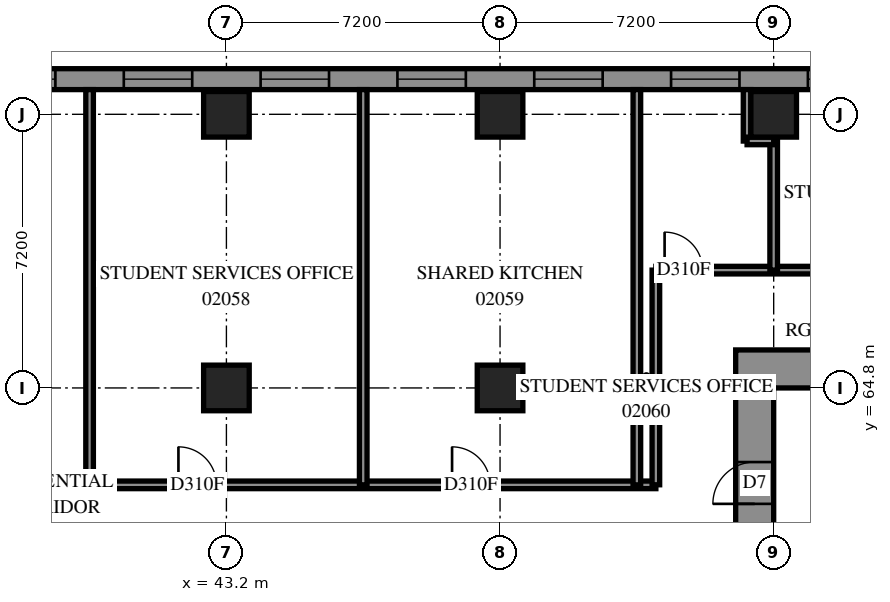
"""IFC4 building model, lengths in metres.
Left out: names, types, materials, properties, quantities, classifications, styles, units other than length and angle.
Written with IfcOpenShell. Run it as: python <this file> out.ifc"""

import sys

from ifc_helpers import new_model, si_unit, direction, frame, frame_2d, origin, origin_2d, place, context, subcontext, project, spatial, polyline, rectangle, outline, extrude, element, fill, save


model = new_model("IFC4")
c1 = context("Model", 3, precision=1e-05, world=origin(), true_north=direction((0.0, 1.0)))
c2 = subcontext(c1, "Body", "Model", "MODEL_VIEW")
j1 = project(units=[si_unit("LENGTHUNIT", "METRE"), si_unit("PLANEANGLEUNIT", "RADIAN")], contexts=[c1])
p1 = place(None, origin())
s1 = spatial("IfcSite", under=j1, at=p1, CompositionType="ELEMENT")
p2 = place(p1, origin())
s2 = spatial("IfcBuilding", under=s1, at=p2, CompositionType="ELEMENT")
p3 = place(p2, frame((0.0, 0.0, 10.2)))
s3 = spatial("IfcBuildingStorey", under=s2, at=p3, CompositionType="ELEMENT", Elevation=10.2)
for number, where, z_axis, x_axis in (
    (1, (43.2, 64.8, 0.0), (0.0, 0.0, 1.0), (1.0, 0.0, 0.0)),
    (2, (43.2, 72.0, 0.0), (0.0, 0.0, 1.0), (1.0, 0.0, 0.0)),
    (3, (50.4, 64.8, 0.0), (0.0, 0.0, 1.0), (1.0, 0.0, 0.0)),
    (4, (50.4, 72.0, 0.0), (0.0, 0.0, 1.0), (1.0, 0.0, 0.0)),
    (5, (57.6, 72.0, 0.0), (0.0, 0.0, 1.0), (1.0, 0.0, 0.0)),
):
    element("IfcColumn", number, at=place(p3, frame(where, z_axis=z_axis, x_axis=x_axis)), inside=s3, PredefinedType="COLUMN", context=c2, shape_type="SweptSolid", body=[
        extrude(rectangle(XDim=1.2, YDim=1.2, at=origin_2d()), origin(), (0.0, 0.0, 1.0), 3.8),
    ])
p4 = place(p3, frame((56.6, 65.3, -0.4), z_axis=(0.0, 0.0, 1.0), x_axis=(1.0, 0.0, 0.0)))
e6 = element("IfcWall", 6, at=p4, inside=s3, PredefinedType="SHEAR", context=c2, shape_type="SweptSolid", body=[
    extrude(rectangle(XDim=16.4, YDim=1.0, at=frame_2d((8.2, 0.0))), origin(), (0.0, 0.0, 1.0), 3.5),
])
p5 = place(p4, frame((11.0, 0.0, 0.4)))
e7 = element("IfcOpeningElement", 7, at=p5, cuts=e6, PredefinedType="OPENING", context=c2, shape_type="SweptSolid", body=[
    extrude(rectangle(XDim=0.8, YDim=2.1, at=frame_2d((0.4, 1.05))), frame((0.0, 0.51, 0.0), z_axis=(0.0, -1.0, 0.0), x_axis=(1.0, 0.0, 0.0)), (0.0, 0.0, 1.0), 1.02),
])
p6 = place(p3, frame((57.1, 50.4, -0.4), z_axis=(0.0, 0.0, 1.0), x_axis=(0.0, 1.0, 0.0)))
e8 = element("IfcWall", 8, at=p6, inside=s3, PredefinedType="SHEAR", context=c2, shape_type="SweptSolid", body=[
    extrude(rectangle(XDim=14.4, YDim=1.0, at=frame_2d((7.2, 0.0))), origin(), (0.0, 0.0, 1.0), 3.5),
])
p7 = place(p6, frame((4.55, 0.0, 0.4)))
e9 = element("IfcOpeningElement", 9, at=p7, cuts=e8, PredefinedType="OPENING", context=c2, shape_type="SweptSolid", body=[
    extrude(rectangle(XDim=1.1, YDim=2.1, at=frame_2d((0.55, 1.05))), frame((0.0, 0.51, 0.0), z_axis=(0.0, -1.0, 0.0), x_axis=(1.0, 0.0, 0.0)), (0.0, 0.0, 1.0), 1.02),
])
p8 = place(p6, frame((11.35, 0.0, 0.4)))
e10 = element("IfcOpeningElement", 10, at=p8, cuts=e8, PredefinedType="OPENING", context=c2, shape_type="SweptSolid", body=[
    extrude(rectangle(XDim=1.1, YDim=2.1, at=frame_2d((0.55, 1.05))), frame((0.0, 0.51, 0.0), z_axis=(0.0, -1.0, 0.0), x_axis=(1.0, 0.0, 0.0)), (0.0, 0.0, 1.0), 1.02),
])
p9 = place(p3, frame((79.583, 72.925, 0.0), z_axis=(0.0, 0.0, 1.0), x_axis=(-1.0, 0.0, 0.0)))
e11 = element("IfcWall", 11, at=p9, inside=s3, PredefinedType="SOLIDWALL", context=c2, shape_type="SweptSolid", body=[
    extrude(outline(polyline([(-0.114, -0.275), (79.583, -0.275), (79.033, 0.275), (0.114, 0.275), (-0.114, -0.275)])), origin(), (0.0, 0.0, 1.0), 3.8),
])
p10 = place(p9, frame((1.249, 0.0, 0.7)))
e12 = element("IfcOpeningElement", 12, at=p10, cuts=e11, PredefinedType="OPENING", context=c2, shape_type="SweptSolid", body=[
    extrude(rectangle(XDim=1.8, YDim=2.6, at=frame_2d((0.9, 1.3))), frame((0.0, 0.285, 0.0), z_axis=(0.0, -1.0, 0.0), x_axis=(1.0, 0.0, 0.0)), (0.0, 0.0, 1.0), 0.57),
])
p11 = place(p9, frame((4.883, 0.0, 0.7)))
e13 = element("IfcOpeningElement", 13, at=p11, cuts=e11, PredefinedType="OPENING", context=c2, shape_type="SweptSolid", body=[
    extrude(rectangle(XDim=1.8, YDim=2.6, at=frame_2d((0.9, 1.3))), frame((0.0, 0.285, 0.0), z_axis=(0.0, -1.0, 0.0), x_axis=(1.0, 0.0, 0.0)), (0.0, 0.0, 1.0), 0.57),
])
p12 = place(p9, frame((8.483, 0.0, 0.7)))
e14 = element("IfcOpeningElement", 14, at=p12, cuts=e11, PredefinedType="OPENING", context=c2, shape_type="SweptSolid", body=[
    extrude(rectangle(XDim=1.8, YDim=2.6, at=frame_2d((0.9, 1.3))), frame((0.0, 0.285, 0.0), z_axis=(0.0, -1.0, 0.0), x_axis=(1.0, 0.0, 0.0)), (0.0, 0.0, 1.0), 0.57),
])
p13 = place(p9, frame((12.083, 0.0, 0.7)))
e15 = element("IfcOpeningElement", 15, at=p13, cuts=e11, PredefinedType="OPENING", context=c2, shape_type="SweptSolid", body=[
    extrude(rectangle(XDim=1.8, YDim=2.6, at=frame_2d((0.9, 1.3))), frame((0.0, 0.285, 0.0), z_axis=(0.0, -1.0, 0.0), x_axis=(1.0, 0.0, 0.0)), (0.0, 0.0, 1.0), 0.57),
])
p14 = place(p9, frame((15.683, 0.0, 0.7)))
e16 = element("IfcOpeningElement", 16, at=p14, cuts=e11, PredefinedType="OPENING", context=c2, shape_type="SweptSolid", body=[
    extrude(rectangle(XDim=1.8, YDim=2.6, at=frame_2d((0.9, 1.3))), frame((0.0, 0.285, 0.0), z_axis=(0.0, -1.0, 0.0), x_axis=(1.0, 0.0, 0.0)), (0.0, 0.0, 1.0), 0.57),
])
p15 = place(p9, frame((19.283, 0.0, 0.7)))
e17 = element("IfcOpeningElement", 17, at=p15, cuts=e11, PredefinedType="OPENING", context=c2, shape_type="SweptSolid", body=[
    extrude(rectangle(XDim=1.8, YDim=2.6, at=frame_2d((0.9, 1.3))), frame((0.0, 0.285, 0.0), z_axis=(0.0, -1.0, 0.0), x_axis=(1.0, 0.0, 0.0)), (0.0, 0.0, 1.0), 0.57),
])
p16 = place(p9, frame((22.883, 0.0, 0.7)))
e18 = element("IfcOpeningElement", 18, at=p16, cuts=e11, PredefinedType="OPENING", context=c2, shape_type="SweptSolid", body=[
    extrude(rectangle(XDim=1.8, YDim=2.6, at=frame_2d((0.9, 1.3))), frame((0.0, 0.285, 0.0), z_axis=(0.0, -1.0, 0.0), x_axis=(1.0, 0.0, 0.0)), (0.0, 0.0, 1.0), 0.57),
])
p17 = place(p9, frame((26.483, 0.0, 0.7)))
e19 = element("IfcOpeningElement", 19, at=p17, cuts=e11, PredefinedType="OPENING", context=c2, shape_type="SweptSolid", body=[
    extrude(rectangle(XDim=1.8, YDim=2.6, at=frame_2d((0.9, 1.3))), frame((0.0, 0.285, 0.0), z_axis=(0.0, -1.0, 0.0), x_axis=(1.0, 0.0, 0.0)), (0.0, 0.0, 1.0), 0.57),
])
p18 = place(p9, frame((30.083, 0.0, 0.7)))
e20 = element("IfcOpeningElement", 20, at=p18, cuts=e11, PredefinedType="OPENING", context=c2, shape_type="SweptSolid", body=[
    extrude(rectangle(XDim=1.8, YDim=2.6, at=frame_2d((0.9, 1.3))), frame((0.0, 0.285, 0.0), z_axis=(0.0, -1.0, 0.0), x_axis=(1.0, 0.0, 0.0)), (0.0, 0.0, 1.0), 0.57),
])
p19 = place(p9, frame((33.683, 0.0, 0.7)))
e21 = element("IfcOpeningElement", 21, at=p19, cuts=e11, PredefinedType="OPENING", context=c2, shape_type="SweptSolid", body=[
    extrude(rectangle(XDim=1.8, YDim=2.6, at=frame_2d((0.9, 1.3))), frame((0.0, 0.285, 0.0), z_axis=(0.0, -1.0, 0.0), x_axis=(1.0, 0.0, 0.0)), (0.0, 0.0, 1.0), 0.57),
])
p20 = place(p9, frame((37.283, 0.0, 0.7)))
e22 = element("IfcOpeningElement", 22, at=p20, cuts=e11, PredefinedType="OPENING", context=c2, shape_type="SweptSolid", body=[
    extrude(rectangle(XDim=1.8, YDim=2.6, at=frame_2d((0.9, 1.3))), frame((0.0, 0.285, 0.0), z_axis=(0.0, -1.0, 0.0), x_axis=(1.0, 0.0, 0.0)), (0.0, 0.0, 1.0), 0.57),
])
p21 = place(p9, frame((40.883, 0.0, 0.7)))
e23 = element("IfcOpeningElement", 23, at=p21, cuts=e11, PredefinedType="OPENING", context=c2, shape_type="SweptSolid", body=[
    extrude(rectangle(XDim=1.8, YDim=2.6, at=frame_2d((0.9, 1.3))), frame((0.0, 0.285, 0.0), z_axis=(0.0, -1.0, 0.0), x_axis=(1.0, 0.0, 0.0)), (0.0, 0.0, 1.0), 0.57),
])
p22 = place(p9, frame((44.483, 0.0, 0.7)))
e24 = element("IfcOpeningElement", 24, at=p22, cuts=e11, PredefinedType="OPENING", context=c2, shape_type="SweptSolid", body=[
    extrude(rectangle(XDim=1.8, YDim=2.6, at=frame_2d((0.9, 1.3))), frame((0.0, 0.285, 0.0), z_axis=(0.0, -1.0, 0.0), x_axis=(1.0, 0.0, 0.0)), (0.0, 0.0, 1.0), 0.57),
])
p23 = place(p9, frame((48.083, 0.0, 0.7)))
e25 = element("IfcOpeningElement", 25, at=p23, cuts=e11, PredefinedType="OPENING", context=c2, shape_type="SweptSolid", body=[
    extrude(rectangle(XDim=1.8, YDim=2.6, at=frame_2d((0.9, 1.3))), frame((0.0, 0.285, 0.0), z_axis=(0.0, -1.0, 0.0), x_axis=(1.0, 0.0, 0.0)), (0.0, 0.0, 1.0), 0.57),
])
p24 = place(p9, frame((51.683, 0.0, 0.7)))
e26 = element("IfcOpeningElement", 26, at=p24, cuts=e11, PredefinedType="OPENING", context=c2, shape_type="SweptSolid", body=[
    extrude(rectangle(XDim=1.8, YDim=2.6, at=frame_2d((0.9, 1.3))), frame((0.0, 0.285, 0.0), z_axis=(0.0, -1.0, 0.0), x_axis=(1.0, 0.0, 0.0)), (0.0, 0.0, 1.0), 0.57),
])
p25 = place(p9, frame((55.283, 0.0, 0.7)))
e27 = element("IfcOpeningElement", 27, at=p25, cuts=e11, PredefinedType="OPENING", context=c2, shape_type="SweptSolid", body=[
    extrude(rectangle(XDim=1.8, YDim=2.6, at=frame_2d((0.9, 1.3))), frame((0.0, 0.285, 0.0), z_axis=(0.0, -1.0, 0.0), x_axis=(1.0, 0.0, 0.0)), (0.0, 0.0, 1.0), 0.57),
])
p26 = place(p9, frame((58.883, 0.0, 0.7)))
e28 = element("IfcOpeningElement", 28, at=p26, cuts=e11, PredefinedType="OPENING", context=c2, shape_type="SweptSolid", body=[
    extrude(rectangle(XDim=1.8, YDim=2.6, at=frame_2d((0.9, 1.3))), frame((0.0, 0.285, 0.0), z_axis=(0.0, -1.0, 0.0), x_axis=(1.0, 0.0, 0.0)), (0.0, 0.0, 1.0), 0.57),
])
p27 = place(p9, frame((62.483, 0.0, 0.7)))
e29 = element("IfcOpeningElement", 29, at=p27, cuts=e11, PredefinedType="OPENING", context=c2, shape_type="SweptSolid", body=[
    extrude(rectangle(XDim=1.8, YDim=2.6, at=frame_2d((0.9, 1.3))), frame((0.0, 0.285, 0.0), z_axis=(0.0, -1.0, 0.0), x_axis=(1.0, 0.0, 0.0)), (0.0, 0.0, 1.0), 0.57),
])
p28 = place(p9, frame((66.083, 0.0, 0.7)))
e30 = element("IfcOpeningElement", 30, at=p28, cuts=e11, PredefinedType="OPENING", context=c2, shape_type="SweptSolid", body=[
    extrude(rectangle(XDim=1.8, YDim=2.6, at=frame_2d((0.9, 1.3))), frame((0.0, 0.285, 0.0), z_axis=(0.0, -1.0, 0.0), x_axis=(1.0, 0.0, 0.0)), (0.0, 0.0, 1.0), 0.57),
])
p29 = place(p9, frame((69.683, 0.0, 0.7)))
e31 = element("IfcOpeningElement", 31, at=p29, cuts=e11, PredefinedType="OPENING", context=c2, shape_type="SweptSolid", body=[
    extrude(rectangle(XDim=1.8, YDim=2.6, at=frame_2d((0.9, 1.3))), frame((0.0, 0.285, 0.0), z_axis=(0.0, -1.0, 0.0), x_axis=(1.0, 0.0, 0.0)), (0.0, 0.0, 1.0), 0.57),
])
p30 = place(p9, frame((73.683, 0.0, 0.7)))
e32 = element("IfcOpeningElement", 32, at=p30, cuts=e11, PredefinedType="OPENING", context=c2, shape_type="SweptSolid", body=[
    extrude(rectangle(XDim=1.8, YDim=2.6, at=frame_2d((0.9, 1.3))), frame((0.0, 0.285, 0.0), z_axis=(0.0, -1.0, 0.0), x_axis=(1.0, 0.0, 0.0)), (0.0, 0.0, 1.0), 0.57),
])
p31 = place(p9, frame((76.508, 0.0, 0.7)))
e33 = element("IfcOpeningElement", 33, at=p31, cuts=e11, PredefinedType="OPENING", context=c2, shape_type="SweptSolid", body=[
    extrude(rectangle(XDim=1.8, YDim=2.6, at=frame_2d((0.9, 1.3))), frame((0.0, 0.285, 0.0), z_axis=(0.0, -1.0, 0.0), x_axis=(1.0, 0.0, 0.0)), (0.0, 0.0, 1.0), 0.57),
])
p32 = place(p3, frame((0.002, 62.25, 0.0), z_axis=(0.0, 0.0, 1.0), x_axis=(1.0, 0.0, 0.0)))
e34 = element("IfcWall", 34, at=p32, inside=s3, PredefinedType="PARTITIONING", context=c2, shape_type="SweptSolid", body=[
    extrude(rectangle(XDim=54.498, YDim=0.2, at=frame_2d((27.249, 0.0))), origin(), (0.0, 0.0, 1.0), 3.8),
])
p33 = place(p32, frame((8.667, 0.0, 0.0)))
e35 = element("IfcOpeningElement", 35, at=p33, cuts=e34, PredefinedType="OPENING", context=c2, shape_type="SweptSolid", body=[
    extrude(rectangle(XDim=1.0, YDim=2.1, at=frame_2d((0.5, 1.05))), frame((0.0, 0.11, 0.0), z_axis=(0.0, -1.0, 0.0), x_axis=(1.0, 0.0, 0.0)), (0.0, 0.0, 1.0), 0.22),
])
p34 = place(p32, frame((13.136, 0.0, 0.0)))
e36 = element("IfcOpeningElement", 36, at=p34, cuts=e34, PredefinedType="OPENING", context=c2, shape_type="SweptSolid", body=[
    extrude(rectangle(XDim=1.0, YDim=2.1, at=frame_2d((0.5, 1.05))), frame((0.0, 0.11, 0.0), z_axis=(0.0, -1.0, 0.0), x_axis=(1.0, 0.0, 0.0)), (0.0, 0.0, 1.0), 0.22),
])
p35 = place(p32, frame((20.335, 0.0, 0.0)))
e37 = element("IfcOpeningElement", 37, at=p35, cuts=e34, PredefinedType="OPENING", context=c2, shape_type="SweptSolid", body=[
    extrude(rectangle(XDim=1.0, YDim=2.1, at=frame_2d((0.5, 1.05))), frame((0.0, 0.11, 0.0), z_axis=(0.0, -1.0, 0.0), x_axis=(1.0, 0.0, 0.0)), (0.0, 0.0, 1.0), 0.22),
])
p36 = place(p32, frame((27.535, 0.0, 0.0)))
e38 = element("IfcOpeningElement", 38, at=p36, cuts=e34, PredefinedType="OPENING", context=c2, shape_type="SweptSolid", body=[
    extrude(rectangle(XDim=1.0, YDim=2.1, at=frame_2d((0.5, 1.05))), frame((0.0, 0.11, 0.0), z_axis=(0.0, -1.0, 0.0), x_axis=(1.0, 0.0, 0.0)), (0.0, 0.0, 1.0), 0.22),
])
p37 = place(p32, frame((34.736, 0.0, 0.0)))
e39 = element("IfcOpeningElement", 39, at=p37, cuts=e34, PredefinedType="OPENING", context=c2, shape_type="SweptSolid", body=[
    extrude(rectangle(XDim=1.0, YDim=2.1, at=frame_2d((0.5, 1.05))), frame((0.0, 0.11, 0.0), z_axis=(0.0, -1.0, 0.0), x_axis=(1.0, 0.0, 0.0)), (0.0, 0.0, 1.0), 0.22),
])
p38 = place(p32, frame((41.935, 0.0, 0.0)))
e40 = element("IfcOpeningElement", 40, at=p38, cuts=e34, PredefinedType="OPENING", context=c2, shape_type="SweptSolid", body=[
    extrude(rectangle(XDim=1.0, YDim=2.1, at=frame_2d((0.5, 1.05))), frame((0.0, 0.11, 0.0), z_axis=(0.0, -1.0, 0.0), x_axis=(1.0, 0.0, 0.0)), (0.0, 0.0, 1.0), 0.22),
])
p39 = place(p32, frame((49.136, 0.0, 0.0)))
e41 = element("IfcOpeningElement", 41, at=p39, cuts=e34, PredefinedType="OPENING", context=c2, shape_type="SweptSolid", body=[
    extrude(rectangle(XDim=1.0, YDim=2.1, at=frame_2d((0.5, 1.05))), frame((0.0, 0.11, 0.0), z_axis=(0.0, -1.0, 0.0), x_axis=(1.0, 0.0, 0.0)), (0.0, 0.0, 1.0), 0.22),
])
p40 = place(p32, frame((4.799, 0.0, 0.0)))
e42 = element("IfcOpeningElement", 42, at=p40, cuts=e34, PredefinedType="OPENING", context=c2, shape_type="SweptSolid", body=[
    extrude(rectangle(XDim=1.0, YDim=2.1, at=frame_2d((0.5, 1.05))), frame((0.0, 0.11, 0.0), z_axis=(0.0, -1.0, 0.0), x_axis=(1.0, 0.0, 0.0)), (0.0, 0.0, 1.0), 0.22),
])
p41 = place(p3, frame((54.5, 67.9, 0.0), z_axis=(0.0, 0.0, 1.0), x_axis=(1.0, 0.0, 0.0)))
e43 = element("IfcWall", 43, at=p41, inside=s3, PredefinedType="PARTITIONING", context=c2, shape_type="SweptSolid", body=[
    extrude(rectangle(XDim=20.6, YDim=0.2, at=frame_2d((10.3, 0.0))), origin(), (0.0, 0.0, 1.0), 3.8),
])
p42 = place(p41, frame((0.23, 0.0, 0.0)))
e44 = element("IfcOpeningElement", 44, at=p42, cuts=e43, PredefinedType="OPENING", context=c2, shape_type="SweptSolid", body=[
    extrude(rectangle(XDim=1.0, YDim=2.1, at=frame_2d((0.5, 1.05))), frame((0.0, 0.11, 0.0), z_axis=(0.0, -1.0, 0.0), x_axis=(1.0, 0.0, 0.0)), (0.0, 0.0, 1.0), 0.22),
])
p43 = place(p41, frame((19.37, 0.0, 0.0)))
e45 = element("IfcOpeningElement", 45, at=p43, cuts=e43, PredefinedType="OPENING", context=c2, shape_type="SweptSolid", body=[
    extrude(rectangle(XDim=1.0, YDim=2.1, at=frame_2d((0.5, 1.05))), frame((0.0, 0.11, 0.0), z_axis=(0.0, -1.0, 0.0), x_axis=(1.0, 0.0, 0.0)), (0.0, 0.0, 1.0), 0.22),
])
p44 = place(p41, frame((6.657, 0.0, 0.0)))
e46 = element("IfcOpeningElement", 46, at=p44, cuts=e43, PredefinedType="OPENING", context=c2, shape_type="SweptSolid", body=[
    extrude(rectangle(XDim=1.0, YDim=2.1, at=frame_2d((0.5, 1.05))), frame((0.0, 0.11, 0.0), z_axis=(0.0, -1.0, 0.0), x_axis=(1.0, 0.0, 0.0)), (0.0, 0.0, 1.0), 0.22),
])
p45 = place(p41, frame((13.857, 0.0, 0.0)))
e47 = element("IfcOpeningElement", 47, at=p45, cuts=e43, PredefinedType="OPENING", context=c2, shape_type="SweptSolid", body=[
    extrude(rectangle(XDim=1.0, YDim=2.1, at=frame_2d((0.5, 1.05))), frame((0.0, 0.11, 0.0), z_axis=(0.0, -1.0, 0.0), x_axis=(1.0, 0.0, 0.0)), (0.0, 0.0, 1.0), 0.22),
])
for number, where, z_axis, x_axis in (
    (48, (39.6, 62.25, 0.0), (0.0, 0.0, 1.0), (0.0, 1.0, 0.0)),
    (49, (46.8, 62.25, 0.0), (0.0, 0.0, 1.0), (0.0, 1.0, 0.0)),
    (50, (54.0, 62.25, 0.0), (0.0, 0.0, 1.0), (0.0, 1.0, 0.0)),
):
    element("IfcWall", number, at=place(p3, frame(where, z_axis=z_axis, x_axis=x_axis)), inside=s3, PredefinedType="PARTITIONING", context=c2, shape_type="SweptSolid", body=[
        extrude(rectangle(XDim=10.4, YDim=0.2, at=frame_2d((5.2, 0.0))), origin(), (0.0, 0.0, 1.0), 3.8),
    ])
p46 = place(p3, frame((54.5, 62.252, 0.0), z_axis=(0.0, 0.0, 1.0), x_axis=(0.0, 1.0, 0.0)))
e51 = element("IfcWall", 51, at=p46, inside=s3, PredefinedType="PARTITIONING", context=c2, shape_type="SweptSolid", body=[
    extrude(rectangle(XDim=5.648, YDim=0.2, at=frame_2d((2.824, 0.0))), origin(), (0.0, 0.0, 1.0), 3.8),
])
p47 = place(p3, frame((57.6, 67.9, 0.0), z_axis=(0.0, 0.0, 1.0), x_axis=(0.0, 1.0, 0.0)))
e52 = element("IfcWall", 52, at=p47, inside=s3, PredefinedType="PARTITIONING", context=c2, shape_type="SweptSolid", body=[
    extrude(rectangle(XDim=3.396, YDim=0.2, at=frame_2d((1.698, 0.0))), origin(), (0.0, 0.0, 1.0), 3.8),
])
p48 = place(p3, frame((56.9, 71.296, 0.0), z_axis=(0.0, 0.0, 1.0), x_axis=(0.0, 1.0, 0.0)))
e53 = element("IfcWall", 53, at=p48, inside=s3, PredefinedType="PARTITIONING", context=c2, shape_type="SweptSolid", body=[
    extrude(rectangle(XDim=1.354, YDim=0.2, at=frame_2d((0.677, 0.0))), origin(), (0.0, 0.0, 1.0), 3.8),
])
p49 = place(p3, frame((56.9, 71.3, 0.0), z_axis=(0.0, 0.0, 1.0), x_axis=(1.0, 0.0, 0.0)))
e54 = element("IfcWall", 54, at=p49, inside=s3, PredefinedType="PARTITIONING", context=c2, shape_type="SweptSolid", body=[
    extrude(rectangle(XDim=0.7, YDim=0.2, at=frame_2d((0.35, 0.0))), origin(), (0.0, 0.0, 1.0), 3.8),
])
p50 = place(p15, origin())
e55 = element("IfcWindow", 55, at=p50, inside=s3, PartitioningType="SINGLE_PANEL", PredefinedType="WINDOW", context=c2, shape_type="SweptSolid", body=[
    extrude(rectangle(XDim=1.8, YDim=2.6, at=frame_2d((0.9, 1.3))), frame((0.0, 0.155, 0.0), z_axis=(0.0, -1.0, 0.0), x_axis=(1.0, 0.0, 0.0)), (0.0, 0.0, 1.0), 0.06),
])
fill(e17, e55)
p51 = place(p16, origin())
e56 = element("IfcWindow", 56, at=p51, inside=s3, PartitioningType="SINGLE_PANEL", PredefinedType="WINDOW", context=c2, shape_type="SweptSolid", body=[
    extrude(rectangle(XDim=1.8, YDim=2.6, at=frame_2d((0.9, 1.3))), frame((0.0, 0.155, 0.0), z_axis=(0.0, -1.0, 0.0), x_axis=(1.0, 0.0, 0.0)), (0.0, 0.0, 1.0), 0.06),
])
fill(e18, e56)
p52 = place(p17, origin())
e57 = element("IfcWindow", 57, at=p52, inside=s3, PartitioningType="SINGLE_PANEL", PredefinedType="WINDOW", context=c2, shape_type="SweptSolid", body=[
    extrude(rectangle(XDim=1.8, YDim=2.6, at=frame_2d((0.9, 1.3))), frame((0.0, 0.155, 0.0), z_axis=(0.0, -1.0, 0.0), x_axis=(1.0, 0.0, 0.0)), (0.0, 0.0, 1.0), 0.06),
])
fill(e19, e57)
p53 = place(p18, origin())
e58 = element("IfcWindow", 58, at=p53, inside=s3, PartitioningType="SINGLE_PANEL", PredefinedType="WINDOW", context=c2, shape_type="SweptSolid", body=[
    extrude(rectangle(XDim=1.8, YDim=2.6, at=frame_2d((0.9, 1.3))), frame((0.0, 0.155, 0.0), z_axis=(0.0, -1.0, 0.0), x_axis=(1.0, 0.0, 0.0)), (0.0, 0.0, 1.0), 0.06),
])
fill(e20, e58)
p54 = place(p19, origin())
e59 = element("IfcWindow", 59, at=p54, inside=s3, PartitioningType="SINGLE_PANEL", PredefinedType="WINDOW", context=c2, shape_type="SweptSolid", body=[
    extrude(rectangle(XDim=1.8, YDim=2.6, at=frame_2d((0.9, 1.3))), frame((0.0, 0.155, 0.0), z_axis=(0.0, -1.0, 0.0), x_axis=(1.0, 0.0, 0.0)), (0.0, 0.0, 1.0), 0.06),
])
fill(e21, e59)
p55 = place(p20, origin())
e60 = element("IfcWindow", 60, at=p55, inside=s3, PartitioningType="SINGLE_PANEL", PredefinedType="WINDOW", context=c2, shape_type="SweptSolid", body=[
    extrude(rectangle(XDim=1.8, YDim=2.6, at=frame_2d((0.9, 1.3))), frame((0.0, 0.155, 0.0), z_axis=(0.0, -1.0, 0.0), x_axis=(1.0, 0.0, 0.0)), (0.0, 0.0, 1.0), 0.06),
])
fill(e22, e60)
p56 = place(p21, origin())
e61 = element("IfcWindow", 61, at=p56, inside=s3, PartitioningType="SINGLE_PANEL", PredefinedType="WINDOW", context=c2, shape_type="SweptSolid", body=[
    extrude(rectangle(XDim=1.8, YDim=2.6, at=frame_2d((0.9, 1.3))), frame((0.0, 0.155, 0.0), z_axis=(0.0, -1.0, 0.0), x_axis=(1.0, 0.0, 0.0)), (0.0, 0.0, 1.0), 0.06),
])
fill(e23, e61)
p57 = place(p8, origin())
e62 = element("IfcDoor", 62, at=p57, inside=s3, OperationType="SINGLE_SWING_LEFT", PredefinedType="DOOR", context=c2, shape_type="SweptSolid", body=[
    extrude(rectangle(XDim=1.1, YDim=2.1, at=frame_2d((0.55, 1.05))), frame((0.0, 0.025, 0.0), z_axis=(0.0, -1.0, 0.0), x_axis=(1.0, 0.0, 0.0)), (0.0, 0.0, 1.0), 0.05),
])
fill(e10, e62)
p58 = place(p38, origin())
e63 = element("IfcDoor", 63, at=p58, inside=s3, OperationType="SINGLE_SWING_LEFT", PredefinedType="DOOR", context=c2, shape_type="SweptSolid", body=[
    extrude(rectangle(XDim=1.0, YDim=2.1, at=frame_2d((0.5, 1.05))), frame((0.0, 0.025, 0.0), z_axis=(0.0, -1.0, 0.0), x_axis=(1.0, 0.0, 0.0)), (0.0, 0.0, 1.0), 0.05),
])
fill(e40, e63)
p59 = place(p39, origin())
e64 = element("IfcDoor", 64, at=p59, inside=s3, OperationType="SINGLE_SWING_LEFT", PredefinedType="DOOR", context=c2, shape_type="SweptSolid", body=[
    extrude(rectangle(XDim=1.0, YDim=2.1, at=frame_2d((0.5, 1.05))), frame((0.0, 0.025, 0.0), z_axis=(0.0, -1.0, 0.0), x_axis=(1.0, 0.0, 0.0)), (0.0, 0.0, 1.0), 0.05),
])
fill(e41, e64)
p60 = place(p42, origin())
e65 = element("IfcDoor", 65, at=p60, inside=s3, OperationType="SINGLE_SWING_LEFT", PredefinedType="DOOR", context=c2, shape_type="SweptSolid", body=[
    extrude(rectangle(XDim=1.0, YDim=2.1, at=frame_2d((0.5, 1.05))), frame((0.0, 0.025, 0.0), z_axis=(0.0, -1.0, 0.0), x_axis=(1.0, 0.0, 0.0)), (0.0, 0.0, 1.0), 0.05),
])
fill(e44, e65)
save(model, sys.argv[1])
